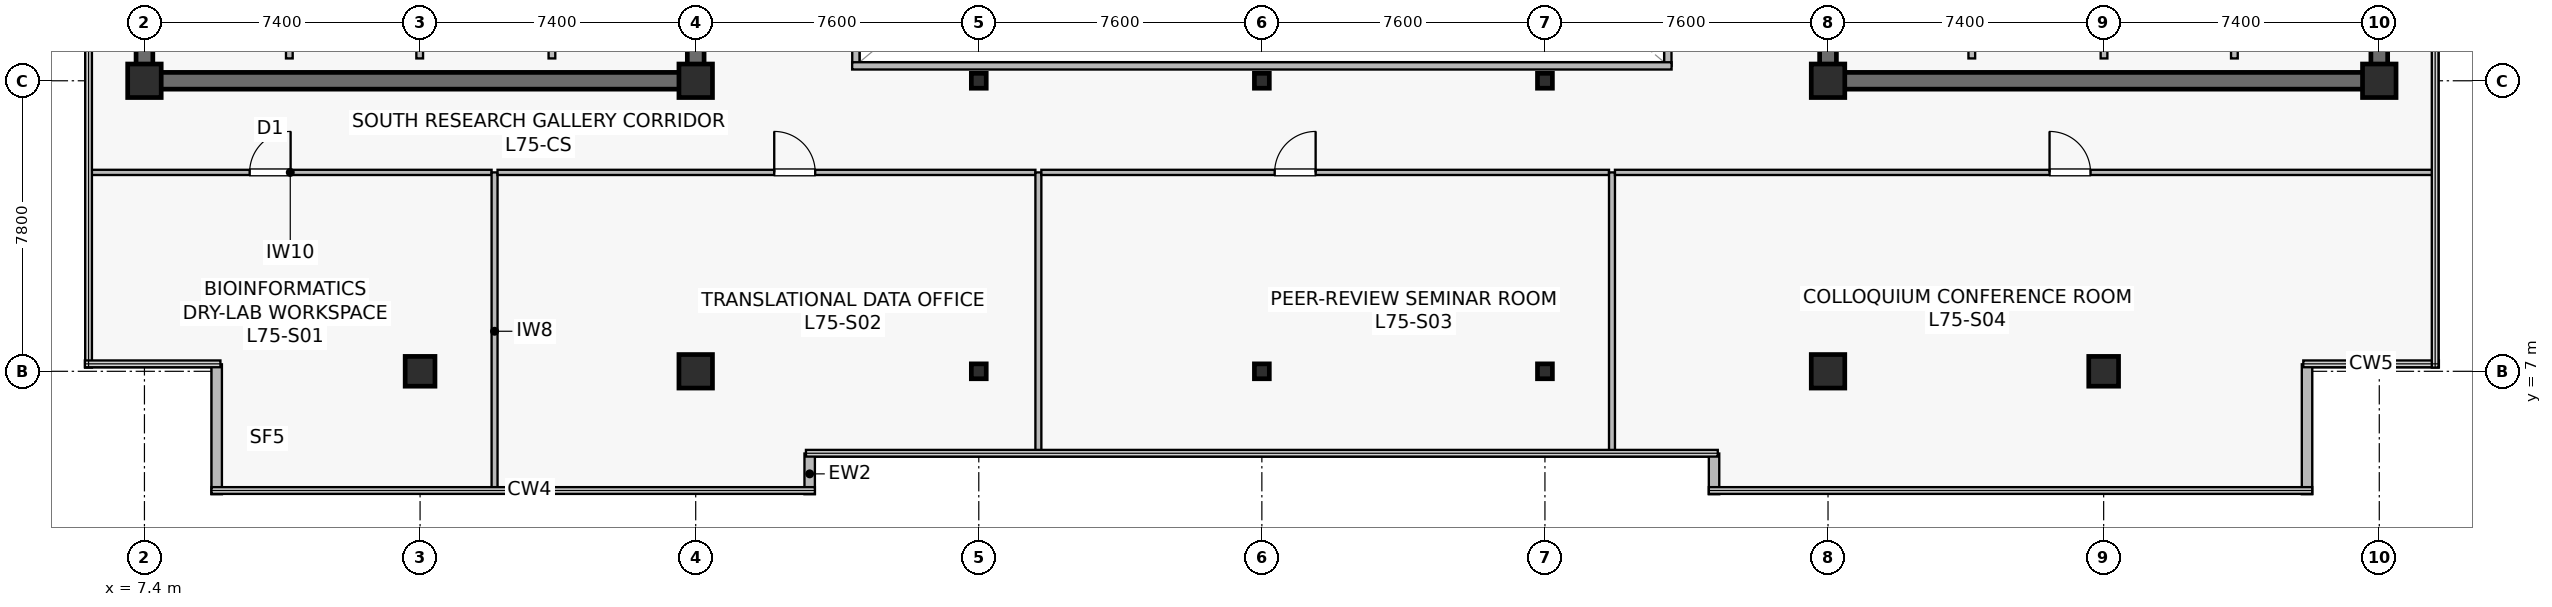
"""IFC4 building model, lengths in metres.
Left out: names, types, materials, properties, quantities, classifications, styles, units other than length and angle.
Written with IfcOpenShell. Run it as: python <this file> out.ifc"""

import sys

from ifc_helpers import new_model, si_unit, direction, frame, frame_2d, origin, origin_2d, place, context, subcontext, project, spatial, rectangle, i_section, extrude, source, transform, mapped, element, fill, save


model = new_model("IFC4")
c1 = context("Model", 3, precision=1e-05, world=origin(), true_north=direction((0.0, 1.0)))
c2 = subcontext(c1, "Body", "Model", "MODEL_VIEW")
j1 = project(units=[si_unit("LENGTHUNIT", "METRE"), si_unit("PLANEANGLEUNIT", "RADIAN")], contexts=[c1])
p1 = place(None, origin())
s1 = spatial("IfcSite", under=j1, at=p1, CompositionType="ELEMENT")
p2 = place(p1, origin())
s2 = spatial("IfcBuilding", under=s1, at=p2, CompositionType="ELEMENT")
p3 = place(p2, frame((0.0, 0.0, 314.4)))
s3 = spatial("IfcBuildingStorey", under=s2, at=p3, CompositionType="ELEMENT", Elevation=314.4)
p4 = place(p3, frame((7.175, 14.8, 0.0), z_axis=(0.0, 0.0, 1.0), x_axis=(1.0, 0.0, 0.0)))
e1 = element("IfcWall", 1, at=p4, inside=s3, PredefinedType="SHEAR", context=c2, shape_type="SweptSolid", body=[
    extrude(rectangle(XDim=15.25, YDim=0.45, at=frame_2d((7.625, 0.0))), origin(), (0.0, 0.0, 1.0), 3.9),
])
p5 = place(p3, frame((7.4, 15.025, 0.0), z_axis=(0.0, 0.0, 1.0), x_axis=(0.0, 1.0, 0.0)))
e2 = element("IfcWall", 2, at=p5, inside=s3, PredefinedType="SHEAR", context=c2, shape_type="SweptSolid", body=[
    extrude(rectangle(XDim=18.55, YDim=0.45, at=frame_2d((9.275, 0.0))), origin(), (0.0, 0.0, 1.0), 3.9),
])
p6 = place(p3, frame((22.2, 15.025, 0.0), z_axis=(0.0, 0.0, 1.0), x_axis=(0.0, 1.0, 0.0)))
e3 = element("IfcWall", 3, at=p6, inside=s3, PredefinedType="SHEAR", context=c2, shape_type="SweptSolid", body=[
    extrude(rectangle(XDim=18.55, YDim=0.45, at=frame_2d((9.275, 0.0))), origin(), (0.0, 0.0, 1.0), 3.9),
])
p7 = place(p6, frame((3.525, 0.0, 0.0)))
e4 = element("IfcOpeningElement", 4, at=p7, cuts=e3, PredefinedType="OPENING", context=c2, shape_type="SweptSolid", body=[
    extrude(rectangle(XDim=1.42, YDim=2.2, at=frame_2d((0.71, 1.1))), frame((0.0, 0.235, 0.0), z_axis=(0.0, -1.0, 0.0), x_axis=(1.0, 0.0, 0.0)), (0.0, 0.0, 1.0), 0.47),
])
p8 = place(p3, frame((52.375, 14.8, 0.0), z_axis=(0.0, 0.0, 1.0), x_axis=(1.0, 0.0, 0.0)))
e5 = element("IfcWall", 5, at=p8, inside=s3, PredefinedType="SHEAR", context=c2, shape_type="SweptSolid", body=[
    extrude(rectangle(XDim=15.25, YDim=0.45, at=frame_2d((7.625, 0.0))), origin(), (0.0, 0.0, 1.0), 3.9),
])
p9 = place(p3, frame((52.6, 15.025, 0.0), z_axis=(0.0, 0.0, 1.0), x_axis=(0.0, 1.0, 0.0)))
e6 = element("IfcWall", 6, at=p9, inside=s3, PredefinedType="SHEAR", context=c2, shape_type="SweptSolid", body=[
    extrude(rectangle(XDim=18.55, YDim=0.45, at=frame_2d((9.275, 0.0))), origin(), (0.0, 0.0, 1.0), 3.9),
])
p10 = place(p9, frame((3.525, 0.0, 0.0)))
e7 = element("IfcOpeningElement", 7, at=p10, cuts=e6, PredefinedType="OPENING", context=c2, shape_type="SweptSolid", body=[
    extrude(rectangle(XDim=1.42, YDim=2.2, at=frame_2d((0.71, 1.1))), frame((0.0, 0.235, 0.0), z_axis=(0.0, -1.0, 0.0), x_axis=(1.0, 0.0, 0.0)), (0.0, 0.0, 1.0), 0.47),
])
p11 = place(p3, frame((67.4, 15.025, 0.0), z_axis=(0.0, 0.0, 1.0), x_axis=(0.0, 1.0, 0.0)))
e8 = element("IfcWall", 8, at=p11, inside=s3, PredefinedType="SHEAR", context=c2, shape_type="SweptSolid", body=[
    extrude(rectangle(XDim=18.55, YDim=0.45, at=frame_2d((9.275, 0.0))), origin(), (0.0, 0.0, 1.0), 3.9),
])
m1 = source(origin(), c2, "Body", "SweptSolid", [
    extrude(rectangle(XDim=0.8, YDim=0.8, at=origin_2d()), origin(), (0.0, 0.0, 1.0), 4.2),
])
p12 = place(p3, frame((14.8, 7.0, 0.0), z_axis=(0.0, 0.0, 1.0), x_axis=(1.0, 0.0, 0.0)))
e9 = element("IfcColumn", 9, at=p12, inside=s3, PredefinedType="COLUMN", context=c2, shape_type="MappedRepresentation", body=[
    mapped(m1, transform((0.0, 0.0, 0.0), scale=1.0)),
])
m2 = source(origin(), c2, "Body", "SweptSolid", [
    extrude(rectangle(XDim=0.9, YDim=0.9, at=origin_2d()), origin(), (0.0, 0.0, 1.0), 4.2),
])
for number, where, z_axis, x_axis in (
    (10, (22.2, 7.0, 0.0), (0.0, 0.0, 1.0), (1.0, 0.0, 0.0)),
    (11, (7.4, 14.8, 0.0), (0.0, 0.0, 1.0), (1.0, 0.0, 0.0)),
    (12, (22.2, 14.8, 0.0), (0.0, 0.0, 1.0), (1.0, 0.0, 0.0)),
    (13, (52.6, 7.0, 0.0), (0.0, 0.0, 1.0), (1.0, 0.0, 0.0)),
):
    element("IfcColumn", number, at=place(p3, frame(where, z_axis=z_axis, x_axis=x_axis)), inside=s3, PredefinedType="COLUMN", context=c2, shape_type="MappedRepresentation", body=[
        mapped(m2, transform((0.0, 0.0, 0.0), scale=1.0)),
    ])
p13 = place(p3, frame((60.0, 7.0, 0.0), z_axis=(0.0, 0.0, 1.0), x_axis=(1.0, 0.0, 0.0)))
e14 = element("IfcColumn", 14, at=p13, inside=s3, PredefinedType="COLUMN", context=c2, shape_type="MappedRepresentation", body=[
    mapped(m1, transform((0.0, 0.0, 0.0), scale=1.0)),
])
for number, where, z_axis, x_axis in (
    (15, (52.6, 14.8, 0.0), (0.0, 0.0, 1.0), (1.0, 0.0, 0.0)),
    (16, (67.4, 14.8, 0.0), (0.0, 0.0, 1.0), (1.0, 0.0, 0.0)),
):
    element("IfcColumn", number, at=place(p3, frame(where, z_axis=z_axis, x_axis=x_axis)), inside=s3, PredefinedType="COLUMN", context=c2, shape_type="MappedRepresentation", body=[
        mapped(m2, transform((0.0, 0.0, 0.0), scale=1.0)),
    ])
m3 = source(origin(), c2, "Body", "SweptSolid", [
    extrude(i_section(OverallWidth=0.4, OverallDepth=0.4, WebThickness=0.021, FlangeThickness=0.021, at=origin_2d()), origin(), (0.0, 0.0, 1.0), 4.2),
])
for number, where, z_axis, x_axis in (
    (17, (29.8, 7.0, 0.0), (0.0, 0.0, 1.0), (1.0, 0.0, 0.0)),
    (18, (29.8, 14.8, 0.0), (0.0, 0.0, 1.0), (1.0, 0.0, 0.0)),
    (19, (37.4, 7.0, 0.0), (0.0, 0.0, 1.0), (1.0, 0.0, 0.0)),
    (20, (37.4, 14.8, 0.0), (0.0, 0.0, 1.0), (1.0, 0.0, 0.0)),
    (21, (45.0, 7.0, 0.0), (0.0, 0.0, 1.0), (1.0, 0.0, 0.0)),
    (22, (45.0, 14.8, 0.0), (0.0, 0.0, 1.0), (1.0, 0.0, 0.0)),
):
    element("IfcColumn", number, at=place(p3, frame(where, z_axis=z_axis, x_axis=x_axis)), inside=s3, PredefinedType="COLUMN", context=c2, shape_type="MappedRepresentation", body=[
        mapped(m3, transform((0.0, 0.0, 0.0), scale=1.0)),
    ])
for number, where, z_axis, x_axis in (
    (23, (25.26, 3.7, 0.0), (0.0, 0.0, 1.0), (0.0, 1.0, 0.0)),
    (24, (49.54, 4.793, 0.0), (0.0, 0.0, 1.0), (0.0, -1.0, 0.0)),
):
    element("IfcWall", number, at=place(p3, frame(where, z_axis=z_axis, x_axis=x_axis)), inside=s3, PredefinedType="STANDARD", context=c2, shape_type="SweptSolid", body=[
        extrude(rectangle(XDim=1.093, YDim=0.28, at=frame_2d((0.546, 0.0))), origin(), (0.0, 0.0, 1.0), 3.9),
    ])
for number, where, z_axis, x_axis in (
    (25, (65.46, 3.7, 0.0), (0.0, 0.0, 1.0), (0.0, 1.0, 0.0)),
    (26, (9.34, 7.188, 0.0), (0.0, 0.0, 1.0), (0.0, -1.0, 0.0)),
):
    element("IfcWall", number, at=place(p3, frame(where, z_axis=z_axis, x_axis=x_axis)), inside=s3, PredefinedType="STANDARD", context=c2, shape_type="SweptSolid", body=[
        extrude(rectangle(XDim=3.488, YDim=0.28, at=frame_2d((1.744, 0.0))), origin(), (0.0, 0.0, 1.0), 3.9),
    ])
p14 = place(p3, frame((11.29, 15.4, 0.0), z_axis=(0.0, 0.0, 1.0), x_axis=(0.0, 1.0, 0.0)))
e27 = element("IfcWall", 27, at=p14, inside=s3, PredefinedType="SOLIDWALL", context=c2, shape_type="SweptSolid", body=[
    extrude(rectangle(XDim=2.4, YDim=0.18, at=frame_2d((1.2, 0.0))), origin(), (0.0, 0.0, 1.0), 3.9),
])
p15 = place(p3, frame((14.79, 15.4, 0.0), z_axis=(0.0, 0.0, 1.0), x_axis=(0.0, 1.0, 0.0)))
e28 = element("IfcWall", 28, at=p15, inside=s3, PredefinedType="SOLIDWALL", context=c2, shape_type="SweptSolid", body=[
    extrude(rectangle(XDim=2.4, YDim=0.18, at=frame_2d((1.2, 0.0))), origin(), (0.0, 0.0, 1.0), 3.297),
])
for number, where, z_axis, x_axis in (
    (29, (18.34, 15.4, 0.0), (0.0, 0.0, 1.0), (0.0, 1.0, 0.0)),
    (30, (63.51, 15.4, 0.0), (0.0, 0.0, 1.0), (0.0, 1.0, 0.0)),
):
    element("IfcWall", number, at=place(p3, frame(where, z_axis=z_axis, x_axis=x_axis)), inside=s3, PredefinedType="SOLIDWALL", context=c2, shape_type="SweptSolid", body=[
        extrude(rectangle(XDim=2.4, YDim=0.18, at=frame_2d((1.2, 0.0))), origin(), (0.0, 0.0, 1.0), 3.9),
    ])
p16 = place(p3, frame((60.01, 15.4, 0.0), z_axis=(0.0, 0.0, 1.0), x_axis=(0.0, 1.0, 0.0)))
e31 = element("IfcWall", 31, at=p16, inside=s3, PredefinedType="SOLIDWALL", context=c2, shape_type="SweptSolid", body=[
    extrude(rectangle(XDim=2.4, YDim=0.18, at=frame_2d((1.2, 0.0))), origin(), (0.0, 0.0, 1.0), 3.297),
])
p17 = place(p3, frame((56.46, 15.4, 0.0), z_axis=(0.0, 0.0, 1.0), x_axis=(0.0, 1.0, 0.0)))
e32 = element("IfcWall", 32, at=p17, inside=s3, PredefinedType="SOLIDWALL", context=c2, shape_type="SweptSolid", body=[
    extrude(rectangle(XDim=2.4, YDim=0.18, at=frame_2d((1.2, 0.0))), origin(), (0.0, 0.0, 1.0), 3.9),
])
p18 = place(p3, frame((26.5, 15.2, 0.0), z_axis=(0.0, 0.0, 1.0), x_axis=(0.0, 1.0, 0.0)))
e33 = element("IfcWall", 33, at=p18, inside=s3, PredefinedType="SOLIDWALL", context=c2, shape_type="SweptSolid", body=[
    extrude(rectangle(XDim=18.2, YDim=0.195, at=frame_2d((9.1, 0.0))), origin(), (0.0, 0.0, 1.0), 3.9),
])
p19 = place(p18, frame((1.8, 0.0, 0.9)))
e34 = element("IfcOpeningElement", 34, at=p19, cuts=e33, PredefinedType="OPENING", context=c2, shape_type="SweptSolid", body=[
    extrude(rectangle(XDim=1.2, YDim=1.35, at=frame_2d((0.6, 0.675))), frame((0.0, 0.107, 0.0), z_axis=(0.0, -1.0, 0.0), x_axis=(1.0, 0.0, 0.0)), (0.0, 0.0, 1.0), 0.215),
])
p20 = place(p18, frame((13.2, 0.0, 0.9)))
e35 = element("IfcOpeningElement", 35, at=p20, cuts=e33, PredefinedType="OPENING", context=c2, shape_type="SweptSolid", body=[
    extrude(rectangle(XDim=1.2, YDim=1.35, at=frame_2d((0.6, 0.675))), frame((0.0, 0.107, 0.0), z_axis=(0.0, -1.0, 0.0), x_axis=(1.0, 0.0, 0.0)), (0.0, 0.0, 1.0), 0.215),
])
p21 = place(p3, frame((48.3, 15.2, 0.0), z_axis=(0.0, 0.0, 1.0), x_axis=(0.0, 1.0, 0.0)))
e36 = element("IfcWall", 36, at=p21, inside=s3, PredefinedType="SOLIDWALL", context=c2, shape_type="SweptSolid", body=[
    extrude(rectangle(XDim=18.2, YDim=0.195, at=frame_2d((9.1, 0.0))), origin(), (0.0, 0.0, 1.0), 3.9),
])
p22 = place(p21, frame((1.8, 0.0, 0.9)))
e37 = element("IfcOpeningElement", 37, at=p22, cuts=e36, PredefinedType="OPENING", context=c2, shape_type="SweptSolid", body=[
    extrude(rectangle(XDim=1.2, YDim=1.35, at=frame_2d((0.6, 0.675))), frame((0.0, 0.107, 0.0), z_axis=(0.0, -1.0, 0.0), x_axis=(1.0, 0.0, 0.0)), (0.0, 0.0, 1.0), 0.215),
])
p23 = place(p21, frame((13.2, 0.0, 0.9)))
e38 = element("IfcOpeningElement", 38, at=p23, cuts=e36, PredefinedType="OPENING", context=c2, shape_type="SweptSolid", body=[
    extrude(rectangle(XDim=1.2, YDim=1.35, at=frame_2d((0.6, 0.675))), frame((0.0, 0.107, 0.0), z_axis=(0.0, -1.0, 0.0), x_axis=(1.0, 0.0, 0.0)), (0.0, 0.0, 1.0), 0.215),
])
p24 = place(p3, frame((26.4, 15.2, 0.0), z_axis=(0.0, 0.0, 1.0), x_axis=(1.0, 0.0, 0.0)))
e39 = element("IfcWall", 39, at=p24, inside=s3, PredefinedType="SOLIDWALL", context=c2, shape_type="SweptSolid", body=[
    extrude(rectangle(XDim=22.0, YDim=0.195, at=frame_2d((11.0, 0.0))), origin(), (0.0, 0.0, 1.0), 3.9),
])
p25 = place(p3, frame((5.91, 12.34, 0.0), z_axis=(0.0, 0.0, 1.0), x_axis=(1.0, 0.0, 0.0)))
e40 = element("IfcWall", 40, at=p25, inside=s3, PredefinedType="PARTITIONING", context=c2, shape_type="SweptSolid", body=[
    extrude(rectangle(XDim=10.81, YDim=0.14, at=frame_2d((5.405, 0.0))), origin(), (0.0, 0.0, 1.0), 3.297),
])
p26 = place(p25, frame((4.314, 0.0, 0.0)))
e41 = element("IfcOpeningElement", 41, at=p26, cuts=e40, PredefinedType="OPENING", context=c2, shape_type="SweptSolid", body=[
    extrude(rectangle(XDim=1.1, YDim=2.18, at=frame_2d((0.55, 1.09))), frame((0.0, 0.08, 0.0), z_axis=(0.0, -1.0, 0.0), x_axis=(1.0, 0.0, 0.0)), (0.0, 0.0, 1.0), 0.16),
])
p27 = place(p3, frame((16.8, 3.81, 0.0), z_axis=(0.0, 0.0, 1.0), x_axis=(0.0, 1.0, 0.0)))
e42 = element("IfcWall", 42, at=p27, inside=s3, PredefinedType="PARTITIONING", context=c2, shape_type="SweptSolid", body=[
    extrude(rectangle(XDim=8.53, YDim=0.16, at=frame_2d((4.265, 0.0))), origin(), (0.0, 0.0, 1.0), 3.235),
])
p28 = place(p3, frame((16.88, 12.34, 0.0), z_axis=(0.0, 0.0, 1.0), x_axis=(1.0, 0.0, 0.0)))
e43 = element("IfcWall", 43, at=p28, inside=s3, PredefinedType="PARTITIONING", context=c2, shape_type="SweptSolid", body=[
    extrude(rectangle(XDim=14.44, YDim=0.14, at=frame_2d((7.22, 0.0))), origin(), (0.0, 0.0, 1.0), 3.297),
])
p29 = place(p28, frame((7.428, 0.0, 0.0)))
e44 = element("IfcOpeningElement", 44, at=p29, cuts=e43, PredefinedType="OPENING", context=c2, shape_type="SweptSolid", body=[
    extrude(rectangle(XDim=1.1, YDim=2.18, at=frame_2d((0.55, 1.09))), frame((0.0, 0.08, 0.0), z_axis=(0.0, -1.0, 0.0), x_axis=(1.0, 0.0, 0.0)), (0.0, 0.0, 1.0), 0.16),
])
p30 = place(p3, frame((31.4, 4.81, 0.0), z_axis=(0.0, 0.0, 1.0), x_axis=(0.0, 1.0, 0.0)))
e45 = element("IfcWall", 45, at=p30, inside=s3, PredefinedType="PARTITIONING", context=c2, shape_type="SweptSolid", body=[
    extrude(rectangle(XDim=7.53, YDim=0.16, at=frame_2d((3.765, 0.0))), origin(), (0.0, 0.0, 1.0), 2.985),
])
p31 = place(p3, frame((31.48, 12.34, 0.0), z_axis=(0.0, 0.0, 1.0), x_axis=(1.0, 0.0, 0.0)))
e46 = element("IfcWall", 46, at=p31, inside=s3, PredefinedType="PARTITIONING", context=c2, shape_type="SweptSolid", body=[
    extrude(rectangle(XDim=15.24, YDim=0.14, at=frame_2d((7.62, 0.0))), origin(), (0.0, 0.0, 1.0), 3.297),
])
p32 = place(p31, frame((6.264, 0.0, 0.0)))
e47 = element("IfcOpeningElement", 47, at=p32, cuts=e46, PredefinedType="OPENING", context=c2, shape_type="SweptSolid", body=[
    extrude(rectangle(XDim=1.1, YDim=2.18, at=frame_2d((0.55, 1.09))), frame((0.0, 0.08, 0.0), z_axis=(0.0, -1.0, 0.0), x_axis=(1.0, 0.0, 0.0)), (0.0, 0.0, 1.0), 0.16),
])
p33 = place(p3, frame((46.8, 4.81, 0.0), z_axis=(0.0, 0.0, 1.0), x_axis=(0.0, 1.0, 0.0)))
e48 = element("IfcWall", 48, at=p33, inside=s3, PredefinedType="PARTITIONING", context=c2, shape_type="SweptSolid", body=[
    extrude(rectangle(XDim=7.53, YDim=0.16, at=frame_2d((3.765, 0.0))), origin(), (0.0, 0.0, 1.0), 2.985),
])
p34 = place(p3, frame((46.88, 12.34, 0.0), z_axis=(0.0, 0.0, 1.0), x_axis=(1.0, 0.0, 0.0)))
e49 = element("IfcWall", 49, at=p34, inside=s3, PredefinedType="PARTITIONING", context=c2, shape_type="SweptSolid", body=[
    extrude(rectangle(XDim=22.01, YDim=0.14, at=frame_2d((11.005, 0.0))), origin(), (0.0, 0.0, 1.0), 3.297),
])
p35 = place(p34, frame((11.667, 0.0, 0.0)))
e50 = element("IfcOpeningElement", 50, at=p35, cuts=e49, PredefinedType="OPENING", context=c2, shape_type="SweptSolid", body=[
    extrude(rectangle(XDim=1.1, YDim=2.18, at=frame_2d((0.55, 1.09))), frame((0.0, 0.08, 0.0), z_axis=(0.0, -1.0, 0.0), x_axis=(1.0, 0.0, 0.0)), (0.0, 0.0, 1.0), 0.16),
])
m4 = source(origin(), c2, "Body", "SweptSolid", [
    extrude(rectangle(XDim=1.1, YDim=2.18, at=frame_2d((0.55, 1.09))), frame((0.0, 0.025, 0.0), z_axis=(0.0, -1.0, 0.0), x_axis=(1.0, 0.0, 0.0)), (0.0, 0.0, 1.0), 0.05),
])
p36 = place(p26, origin())
e51 = element("IfcDoor", 51, at=p36, inside=s3, OperationType="SINGLE_SWING_RIGHT", PredefinedType="DOOR", context=c2, shape_type="MappedRepresentation", body=[
    mapped(m4, transform((0.0, 0.0, 0.0), scale=1.0)),
])
fill(e41, e51)
p37 = place(p29, origin())
e52 = element("IfcDoor", 52, at=p37, inside=s3, OperationType="SINGLE_SWING_LEFT", PredefinedType="DOOR", context=c2, shape_type="MappedRepresentation", body=[
    mapped(m4, transform((0.0, 0.0, 0.0), scale=1.0)),
])
fill(e44, e52)
p38 = place(p32, origin())
e53 = element("IfcDoor", 53, at=p38, inside=s3, OperationType="SINGLE_SWING_RIGHT", PredefinedType="DOOR", context=c2, shape_type="MappedRepresentation", body=[
    mapped(m4, transform((0.0, 0.0, 0.0), scale=1.0)),
])
fill(e47, e53)
p39 = place(p35, origin())
e54 = element("IfcDoor", 54, at=p39, inside=s3, OperationType="SINGLE_SWING_LEFT", PredefinedType="DOOR", context=c2, shape_type="MappedRepresentation", body=[
    mapped(m4, transform((0.0, 0.0, 0.0), scale=1.0)),
])
fill(e50, e54)
save(model, sys.argv[1])
